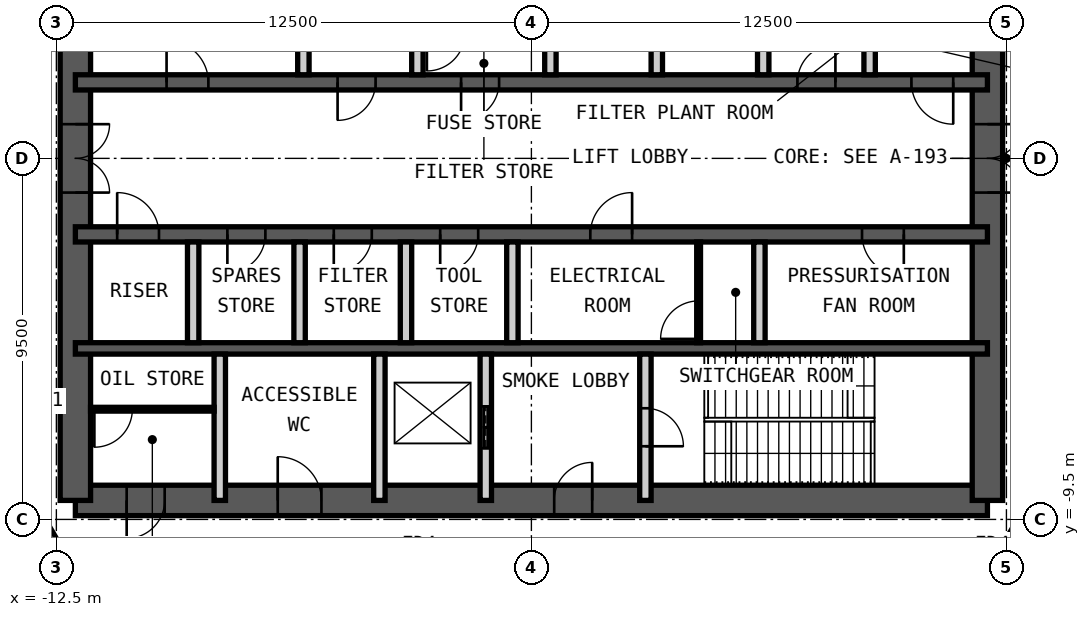
"""IFC4 building model, lengths in metres.
Left out: names, types, materials, properties, quantities, classifications, styles, units other than length and angle.
Written with IfcOpenShell. Run it as: python <this file> out.ifc"""

import sys

from ifc_helpers import new_model, si_unit, direction, frame, frame_2d, origin, place, context, subcontext, project, spatial, rectangle, extrude, element, fill, save


model = new_model("IFC4")
c1 = context("Model", 3, precision=1e-05, world=origin(), true_north=direction((0.0, 1.0)))
c2 = subcontext(c1, "Body", "Model", "MODEL_VIEW")
j1 = project(units=[si_unit("LENGTHUNIT", "METRE"), si_unit("PLANEANGLEUNIT", "RADIAN")], contexts=[c1])
p1 = place(None, origin())
s1 = spatial("IfcSite", under=j1, at=p1, CompositionType="ELEMENT")
p2 = place(p1, origin())
s2 = spatial("IfcBuilding", under=s1, at=p2, CompositionType="ELEMENT")
p3 = place(p2, frame((0.0, 0.0, 337.6)))
s3 = spatial("IfcBuildingStorey", under=s2, at=p3, CompositionType="ELEMENT", Elevation=337.6)
p4 = place(p3, frame((-12.0, -9.0, 0.0), z_axis=(0.0, 0.0, 1.0), x_axis=(1.0, 0.0, 0.0)))
e1 = element("IfcWall", 1, at=p4, inside=s3, PredefinedType="SHEAR", context=c2, shape_type="SweptSolid", body=[
    extrude(rectangle(XDim=24.0, YDim=0.8, at=frame_2d((12.0, 0.0))), origin(), (0.0, 0.0, 1.0), 6.0),
])
p5 = place(p4, frame((1.35, 0.0, 0.0)))
e2 = element("IfcOpeningElement", 2, at=p5, cuts=e1, PredefinedType="OPENING", context=c2, shape_type="SweptSolid", body=[
    extrude(rectangle(XDim=1.0, YDim=2.1, at=frame_2d((0.5, 1.05))), frame((0.0, 0.41, 0.0), z_axis=(0.0, -1.0, 0.0), x_axis=(1.0, 0.0, 0.0)), (0.0, 0.0, 1.0), 0.82),
])
p6 = place(p4, frame((5.325, 0.0, 0.0)))
e3 = element("IfcOpeningElement", 3, at=p6, cuts=e1, PredefinedType="OPENING", context=c2, shape_type="SweptSolid", body=[
    extrude(rectangle(XDim=1.15, YDim=2.1, at=frame_2d((0.575, 1.05))), frame((0.0, 0.41, 0.0), z_axis=(0.0, -1.0, 0.0), x_axis=(1.0, 0.0, 0.0)), (0.0, 0.0, 1.0), 0.82),
])
p7 = place(p4, frame((12.6, 0.0, 0.0)))
e4 = element("IfcOpeningElement", 4, at=p7, cuts=e1, PredefinedType="OPENING", context=c2, shape_type="SweptSolid", body=[
    extrude(rectangle(XDim=1.0, YDim=2.1, at=frame_2d((0.5, 1.05))), frame((0.0, 0.41, 0.0), z_axis=(0.0, -1.0, 0.0), x_axis=(1.0, 0.0, 0.0)), (0.0, 0.0, 1.0), 0.82),
])
p8 = place(p3, frame((12.0, -9.0, 0.0), z_axis=(0.0, 0.0, 1.0), x_axis=(0.0, 1.0, 0.0)))
e5 = element("IfcWall", 5, at=p8, inside=s3, PredefinedType="SHEAR", context=c2, shape_type="SweptSolid", body=[
    extrude(rectangle(XDim=18.0, YDim=0.8, at=frame_2d((9.0, 0.0))), origin(), (0.0, 0.0, 1.0), 6.0),
])
p9 = place(p8, frame((8.1, 0.0, 0.0)))
e6 = element("IfcOpeningElement", 6, at=p9, cuts=e5, PredefinedType="OPENING", context=c2, shape_type="SweptSolid", body=[
    extrude(rectangle(XDim=1.8, YDim=2.1, at=frame_2d((0.9, 1.05))), frame((0.0, 0.41, 0.0), z_axis=(0.0, -1.0, 0.0), x_axis=(1.0, 0.0, 0.0)), (0.0, 0.0, 1.0), 0.82),
])
p10 = place(p3, frame((-12.0, -9.0, 0.0), z_axis=(0.0, 0.0, 1.0), x_axis=(0.0, 1.0, 0.0)))
e7 = element("IfcWall", 7, at=p10, inside=s3, PredefinedType="SHEAR", context=c2, shape_type="SweptSolid", body=[
    extrude(rectangle(XDim=18.0, YDim=0.8, at=frame_2d((9.0, 0.0))), origin(), (0.0, 0.0, 1.0), 6.0),
])
p11 = place(p10, frame((8.1, 0.0, 0.0)))
e8 = element("IfcOpeningElement", 8, at=p11, cuts=e7, PredefinedType="OPENING", context=c2, shape_type="SweptSolid", body=[
    extrude(rectangle(XDim=1.8, YDim=2.1, at=frame_2d((0.9, 1.05))), frame((0.0, 0.41, 0.0), z_axis=(0.0, -1.0, 0.0), x_axis=(1.0, 0.0, 0.0)), (0.0, 0.0, 1.0), 0.82),
])
p12 = place(p3, frame((-12.0, 2.0, 0.0), z_axis=(0.0, 0.0, 1.0), x_axis=(1.0, 0.0, 0.0)))
e9 = element("IfcWall", 9, at=p12, inside=s3, PredefinedType="SHEAR", context=c2, shape_type="SweptSolid", body=[
    extrude(rectangle(XDim=24.0, YDim=0.4, at=frame_2d((12.0, 0.0))), origin(), (0.0, 0.0, 1.0), 6.0),
])
p13 = place(p12, frame((2.4, 0.0, 0.0)))
e10 = element("IfcOpeningElement", 10, at=p13, cuts=e9, PredefinedType="OPENING", context=c2, shape_type="SweptSolid", body=[
    extrude(rectangle(XDim=1.1, YDim=2.1, at=frame_2d((0.55, 1.05))), frame((0.0, 0.21, 0.0), z_axis=(0.0, -1.0, 0.0), x_axis=(1.0, 0.0, 0.0)), (0.0, 0.0, 1.0), 0.42),
])
p14 = place(p12, frame((22.0, 0.0, 0.0)))
e11 = element("IfcOpeningElement", 11, at=p14, cuts=e9, PredefinedType="OPENING", context=c2, shape_type="SweptSolid", body=[
    extrude(rectangle(XDim=1.1, YDim=2.1, at=frame_2d((0.55, 1.05))), frame((0.0, 0.21, 0.0), z_axis=(0.0, -1.0, 0.0), x_axis=(1.0, 0.0, 0.0)), (0.0, 0.0, 1.0), 0.42),
])
p15 = place(p12, frame((10.15, 0.0, 0.0)))
e12 = element("IfcOpeningElement", 12, at=p15, cuts=e9, PredefinedType="OPENING", context=c2, shape_type="SweptSolid", body=[
    extrude(rectangle(XDim=1.0, YDim=2.1, at=frame_2d((0.5, 1.05))), frame((0.0, 0.21, 0.0), z_axis=(0.0, -1.0, 0.0), x_axis=(1.0, 0.0, 0.0)), (0.0, 0.0, 1.0), 0.42),
])
p16 = place(p12, frame((6.9, 0.0, 0.0)))
e13 = element("IfcOpeningElement", 13, at=p16, cuts=e9, PredefinedType="OPENING", context=c2, shape_type="SweptSolid", body=[
    extrude(rectangle(XDim=1.0, YDim=2.1, at=frame_2d((0.5, 1.05))), frame((0.0, 0.21, 0.0), z_axis=(0.0, -1.0, 0.0), x_axis=(1.0, 0.0, 0.0)), (0.0, 0.0, 1.0), 0.42),
])
p17 = place(p12, frame((19.0, 0.0, 0.0)))
e14 = element("IfcOpeningElement", 14, at=p17, cuts=e9, PredefinedType="OPENING", context=c2, shape_type="SweptSolid", body=[
    extrude(rectangle(XDim=1.0, YDim=2.1, at=frame_2d((0.5, 1.05))), frame((0.0, 0.21, 0.0), z_axis=(0.0, -1.0, 0.0), x_axis=(1.0, 0.0, 0.0)), (0.0, 0.0, 1.0), 0.42),
])
p18 = place(p3, frame((-12.0, -2.0, 0.0), z_axis=(0.0, 0.0, 1.0), x_axis=(1.0, 0.0, 0.0)))
e15 = element("IfcWall", 15, at=p18, inside=s3, PredefinedType="SHEAR", context=c2, shape_type="SweptSolid", body=[
    extrude(rectangle(XDim=24.0, YDim=0.4, at=frame_2d((12.0, 0.0))), origin(), (0.0, 0.0, 1.0), 6.0),
])
p19 = place(p18, frame((1.1, 0.0, 0.0)))
e16 = element("IfcOpeningElement", 16, at=p19, cuts=e15, PredefinedType="OPENING", context=c2, shape_type="SweptSolid", body=[
    extrude(rectangle(XDim=1.1, YDim=2.1, at=frame_2d((0.55, 1.05))), frame((0.0, 0.21, 0.0), z_axis=(0.0, -1.0, 0.0), x_axis=(1.0, 0.0, 0.0)), (0.0, 0.0, 1.0), 0.42),
])
p20 = place(p18, frame((13.55, 0.0, 0.0)))
e17 = element("IfcOpeningElement", 17, at=p20, cuts=e15, PredefinedType="OPENING", context=c2, shape_type="SweptSolid", body=[
    extrude(rectangle(XDim=1.1, YDim=2.1, at=frame_2d((0.55, 1.05))), frame((0.0, 0.21, 0.0), z_axis=(0.0, -1.0, 0.0), x_axis=(1.0, 0.0, 0.0)), (0.0, 0.0, 1.0), 0.42),
])
p21 = place(p18, frame((20.7, 0.0, 0.0)))
e18 = element("IfcOpeningElement", 18, at=p21, cuts=e15, PredefinedType="OPENING", context=c2, shape_type="SweptSolid", body=[
    extrude(rectangle(XDim=1.1, YDim=2.1, at=frame_2d((0.55, 1.05))), frame((0.0, 0.21, 0.0), z_axis=(0.0, -1.0, 0.0), x_axis=(1.0, 0.0, 0.0)), (0.0, 0.0, 1.0), 0.42),
])
p22 = place(p18, frame((4.0, 0.0, 0.0)))
e19 = element("IfcOpeningElement", 19, at=p22, cuts=e15, PredefinedType="OPENING", context=c2, shape_type="SweptSolid", body=[
    extrude(rectangle(XDim=1.0, YDim=2.1, at=frame_2d((0.5, 1.05))), frame((0.0, 0.21, 0.0), z_axis=(0.0, -1.0, 0.0), x_axis=(1.0, 0.0, 0.0)), (0.0, 0.0, 1.0), 0.42),
])
p23 = place(p18, frame((6.8, 0.0, 0.0)))
e20 = element("IfcOpeningElement", 20, at=p23, cuts=e15, PredefinedType="OPENING", context=c2, shape_type="SweptSolid", body=[
    extrude(rectangle(XDim=1.0, YDim=2.1, at=frame_2d((0.5, 1.05))), frame((0.0, 0.21, 0.0), z_axis=(0.0, -1.0, 0.0), x_axis=(1.0, 0.0, 0.0)), (0.0, 0.0, 1.0), 0.42),
])
p24 = place(p18, frame((9.6, 0.0, 0.0)))
e21 = element("IfcOpeningElement", 21, at=p24, cuts=e15, PredefinedType="OPENING", context=c2, shape_type="SweptSolid", body=[
    extrude(rectangle(XDim=1.0, YDim=2.1, at=frame_2d((0.5, 1.05))), frame((0.0, 0.21, 0.0), z_axis=(0.0, -1.0, 0.0), x_axis=(1.0, 0.0, 0.0)), (0.0, 0.0, 1.0), 0.42),
])
p25 = place(p3, frame((-12.0, -5.0, 0.0), z_axis=(0.0, 0.0, 1.0), x_axis=(1.0, 0.0, 0.0)))
e22 = element("IfcWall", 22, at=p25, inside=s3, PredefinedType="SHEAR", context=c2, shape_type="SweptSolid", body=[
    extrude(rectangle(XDim=24.0, YDim=0.3, at=frame_2d((12.0, 0.0))), origin(), (0.0, 0.0, 1.0), 6.0),
])
for number, where, z_axis, x_axis in (
    (23, (-6.0, 2.2, 0.0), (0.0, 0.0, 1.0), (0.0, 1.0, 0.0)),
    (24, (-3.0, 2.2, 0.0), (0.0, 0.0, 1.0), (0.0, 1.0, 0.0)),
    (25, (0.5, 2.2, 0.0), (0.0, 0.0, 1.0), (0.0, 1.0, 0.0)),
    (26, (3.3, 2.2, 0.0), (0.0, 0.0, 1.0), (0.0, 1.0, 0.0)),
    (27, (6.1, 2.2, 0.0), (0.0, 0.0, 1.0), (0.0, 1.0, 0.0)),
    (28, (8.9, 2.2, 0.0), (0.0, 0.0, 1.0), (0.0, 1.0, 0.0)),
    (29, (-8.9, -4.85, 0.0), (0.0, 0.0, 1.0), (0.0, 1.0, 0.0)),
    (30, (-6.1, -4.85, 0.0), (0.0, 0.0, 1.0), (0.0, 1.0, 0.0)),
    (31, (-3.3, -4.85, 0.0), (0.0, 0.0, 1.0), (0.0, 1.0, 0.0)),
    (32, (-0.5, -4.85, 0.0), (0.0, 0.0, 1.0), (0.0, 1.0, 0.0)),
    (33, (6.0, -4.85, 0.0), (0.0, 0.0, 1.0), (0.0, 1.0, 0.0)),
):
    element("IfcWall", number, at=place(p3, frame(where, z_axis=z_axis, x_axis=x_axis)), inside=s3, PredefinedType="PARTITIONING", context=c2, shape_type="SweptSolid", body=[
        extrude(rectangle(XDim=2.65, YDim=0.3, at=frame_2d((1.325, 0.0))), origin(), (0.0, 0.0, 1.0), 5.78),
    ])
for number, where, z_axis, x_axis in (
    (34, (-8.2, -9.0, 0.0), (0.0, 0.0, 1.0), (0.0, 1.0, 0.0)),
    (35, (-4.0, -9.0, 0.0), (0.0, 0.0, 1.0), (0.0, 1.0, 0.0)),
):
    element("IfcWall", number, at=place(p3, frame(where, z_axis=z_axis, x_axis=x_axis)), inside=s3, PredefinedType="PARTITIONING", context=c2, shape_type="SweptSolid", body=[
        extrude(rectangle(XDim=3.85, YDim=0.3, at=frame_2d((1.925, 0.0))), origin(), (0.0, 0.0, 1.0), 5.78),
    ])
p26 = place(p3, frame((-1.2, -9.0, 0.0), z_axis=(0.0, 0.0, 1.0), x_axis=(0.0, 1.0, 0.0)))
e36 = element("IfcWall", 36, at=p26, inside=s3, PredefinedType="PARTITIONING", context=c2, shape_type="SweptSolid", body=[
    extrude(rectangle(XDim=3.85, YDim=0.3, at=frame_2d((1.925, 0.0))), origin(), (0.0, 0.0, 1.0), 5.78),
])
p27 = place(p26, frame((1.375, 0.0, 0.0)))
e37 = element("IfcOpeningElement", 37, at=p27, cuts=e36, PredefinedType="OPENING", context=c2, shape_type="SweptSolid", body=[
    extrude(rectangle(XDim=1.1, YDim=2.4, at=frame_2d((0.55, 1.2))), frame((0.0, 0.16, 0.0), z_axis=(0.0, -1.0, 0.0), x_axis=(1.0, 0.0, 0.0)), (0.0, 0.0, 1.0), 0.32),
])
p28 = place(p3, frame((3.0, -9.0, 0.0), z_axis=(0.0, 0.0, 1.0), x_axis=(0.0, 1.0, 0.0)))
e38 = element("IfcWall", 38, at=p28, inside=s3, PredefinedType="PARTITIONING", context=c2, shape_type="SweptSolid", body=[
    extrude(rectangle(XDim=3.85, YDim=0.3, at=frame_2d((1.925, 0.0))), origin(), (0.0, 0.0, 1.0), 5.78),
])
p29 = place(p28, frame((1.425, 0.0, 0.0)))
e39 = element("IfcOpeningElement", 39, at=p29, cuts=e38, PredefinedType="OPENING", context=c2, shape_type="SweptSolid", body=[
    extrude(rectangle(XDim=1.0, YDim=2.1, at=frame_2d((0.5, 1.05))), frame((0.0, 0.16, 0.0), z_axis=(0.0, -1.0, 0.0), x_axis=(1.0, 0.0, 0.0)), (0.0, 0.0, 1.0), 0.32),
])
p30 = place(p3, frame((4.4, -4.85, 0.0), z_axis=(0.0, 0.0, 1.0), x_axis=(0.0, 1.0, 0.0)))
e40 = element("IfcWall", 40, at=p30, inside=s3, PredefinedType="PARTITIONING", context=c2, shape_type="SweptSolid", body=[
    extrude(rectangle(XDim=2.65, YDim=0.1, at=frame_2d((1.325, 0.0))), origin(), (0.0, 0.0, 1.0), 5.78),
])
p31 = place(p30, frame((0.1, 0.0, 0.0)))
e41 = element("IfcOpeningElement", 41, at=p31, cuts=e40, PredefinedType="OPENING", context=c2, shape_type="SweptSolid", body=[
    extrude(rectangle(XDim=1.0, YDim=2.4, at=frame_2d((0.5, 1.2))), frame((0.0, 0.06, 0.0), z_axis=(0.0, -1.0, 0.0), x_axis=(1.0, 0.0, 0.0)), (0.0, 0.0, 1.0), 0.12),
])
p32 = place(p3, frame((-11.6, -6.6, 0.0), z_axis=(0.0, 0.0, 1.0), x_axis=(1.0, 0.0, 0.0)))
e42 = element("IfcWall", 42, at=p32, inside=s3, PredefinedType="PARTITIONING", context=c2, shape_type="SweptSolid", body=[
    extrude(rectangle(XDim=3.25, YDim=0.1, at=frame_2d((1.625, 0.0))), origin(), (0.0, 0.0, 1.0), 5.78),
])
p33 = place(p32, frame((0.1, 0.0, 0.0)))
e43 = element("IfcOpeningElement", 43, at=p33, cuts=e42, PredefinedType="OPENING", context=c2, shape_type="SweptSolid", body=[
    extrude(rectangle(XDim=1.0, YDim=2.4, at=frame_2d((0.5, 1.2))), frame((0.0, 0.06, 0.0), z_axis=(0.0, -1.0, 0.0), x_axis=(1.0, 0.0, 0.0)), (0.0, 0.0, 1.0), 0.12),
])
p34 = place(p3, frame((16.411, -12.096, 0.0), z_axis=(0.0, 0.0, 1.0), x_axis=(-0.866032659912, 0.499987431809, 0.0)))
e44 = element("IfcWall", 44, at=p34, inside=s3, PredefinedType="PARTITIONING", context=c2, shape_type="SweptSolid", body=[
    extrude(rectangle(XDim=4.36, YDim=0.15, at=frame_2d((2.18, 0.0))), origin(), (0.0, 0.0, 1.0), 4.85),
])
p35 = place(p3, frame((15.883, -4.29, 0.0), z_axis=(0.0, 0.0, 1.0), x_axis=(-0.500003318956, -0.866023487576, 0.0)))
e45 = element("IfcWall", 45, at=p35, inside=s3, PredefinedType="PARTITIONING", context=c2, shape_type="SweptSolid", body=[
    extrude(rectangle(XDim=6.496, YDim=0.15, at=frame_2d((3.248, 0.0))), origin(), (0.0, 0.0, 1.0), 5.75),
])
p36 = place(p35, frame((2.348, 0.0, 0.0)))
e46 = element("IfcOpeningElement", 46, at=p36, cuts=e45, PredefinedType="OPENING", context=c2, shape_type="SweptSolid", body=[
    extrude(rectangle(XDim=1.8, YDim=2.4, at=frame_2d((0.9, 1.2))), frame((0.0, 0.085, 0.0), z_axis=(0.0, -1.0, 0.0), x_axis=(1.0, 0.0, 0.0)), (0.0, 0.0, 1.0), 0.17),
])
p37 = place(p3, frame((-11.657, -11.61, 0.0), z_axis=(0.0, 0.0, 1.0), x_axis=(-0.500003318956, 0.866023487576, 0.0)))
e47 = element("IfcWall", 47, at=p37, inside=s3, PredefinedType="PARTITIONING", context=c2, shape_type="SweptSolid", body=[
    extrude(rectangle(XDim=6.496, YDim=0.15, at=frame_2d((3.248, 0.0))), origin(), (0.0, 0.0, 1.0), 5.75),
])
p38 = place(p37, frame((4.297, 0.0, 0.0)))
e48 = element("IfcOpeningElement", 48, at=p38, cuts=e47, PredefinedType="OPENING", context=c2, shape_type="SweptSolid", body=[
    extrude(rectangle(XDim=1.8, YDim=2.4, at=frame_2d((0.9, 1.2))), frame((0.0, 0.085, 0.0), z_axis=(0.0, -1.0, 0.0), x_axis=(1.0, 0.0, 0.0)), (0.0, 0.0, 1.0), 0.17),
])
p39 = place(p5, origin())
e49 = element("IfcDoor", 49, at=p39, inside=s3, OperationType="SINGLE_SWING_LEFT", PredefinedType="DOOR", context=c2, shape_type="SweptSolid", body=[
    extrude(rectangle(XDim=1.0, YDim=2.1, at=frame_2d((0.5, 1.05))), frame((0.0, 0.025, 0.0), z_axis=(0.0, -1.0, 0.0), x_axis=(1.0, 0.0, 0.0)), (0.0, 0.0, 1.0), 0.05),
])
fill(e2, e49)
p40 = place(p6, origin())
e50 = element("IfcDoor", 50, at=p40, inside=s3, OperationType="SINGLE_SWING_RIGHT", PredefinedType="DOOR", context=c2, shape_type="SweptSolid", body=[
    extrude(rectangle(XDim=1.15, YDim=2.1, at=frame_2d((0.575, 1.05))), frame((0.0, 0.025, 0.0), z_axis=(0.0, -1.0, 0.0), x_axis=(1.0, 0.0, 0.0)), (0.0, 0.0, 1.0), 0.05),
])
fill(e3, e50)
p41 = place(p7, origin())
e51 = element("IfcDoor", 51, at=p41, inside=s3, OperationType="SINGLE_SWING_LEFT", PredefinedType="DOOR", context=c2, shape_type="SweptSolid", body=[
    extrude(rectangle(XDim=1.0, YDim=2.1, at=frame_2d((0.5, 1.05))), frame((0.0, 0.025, 0.0), z_axis=(0.0, -1.0, 0.0), x_axis=(1.0, 0.0, 0.0)), (0.0, 0.0, 1.0), 0.05),
])
fill(e4, e51)
p42 = place(p29, origin())
e52 = element("IfcDoor", 52, at=p42, inside=s3, OperationType="SINGLE_SWING_LEFT", PredefinedType="DOOR", context=c2, shape_type="SweptSolid", body=[
    extrude(rectangle(XDim=1.0, YDim=2.1, at=frame_2d((0.5, 1.05))), frame((0.0, 0.025, 0.0), z_axis=(0.0, -1.0, 0.0), x_axis=(1.0, 0.0, 0.0)), (0.0, 0.0, 1.0), 0.05),
])
fill(e39, e52)
p43 = place(p13, origin())
e53 = element("IfcDoor", 53, at=p43, inside=s3, OperationType="SINGLE_SWING_RIGHT", PredefinedType="DOOR", context=c2, shape_type="SweptSolid", body=[
    extrude(rectangle(XDim=1.1, YDim=2.1, at=frame_2d((0.55, 1.05))), frame((0.0, 0.025, 0.0), z_axis=(0.0, -1.0, 0.0), x_axis=(1.0, 0.0, 0.0)), (0.0, 0.0, 1.0), 0.05),
])
fill(e10, e53)
p44 = place(p19, origin())
e54 = element("IfcDoor", 54, at=p44, inside=s3, OperationType="SINGLE_SWING_RIGHT", PredefinedType="DOOR", context=c2, shape_type="SweptSolid", body=[
    extrude(rectangle(XDim=1.1, YDim=2.1, at=frame_2d((0.55, 1.05))), frame((0.0, 0.025, 0.0), z_axis=(0.0, -1.0, 0.0), x_axis=(1.0, 0.0, 0.0)), (0.0, 0.0, 1.0), 0.05),
])
fill(e16, e54)
p45 = place(p14, origin())
e55 = element("IfcDoor", 55, at=p45, inside=s3, OperationType="SINGLE_SWING_RIGHT", PredefinedType="DOOR", context=c2, shape_type="SweptSolid", body=[
    extrude(rectangle(XDim=1.1, YDim=2.1, at=frame_2d((0.55, 1.05))), frame((0.0, 0.025, 0.0), z_axis=(0.0, -1.0, 0.0), x_axis=(1.0, 0.0, 0.0)), (0.0, 0.0, 1.0), 0.05),
])
fill(e11, e55)
p46 = place(p15, origin())
e56 = element("IfcDoor", 56, at=p46, inside=s3, OperationType="SINGLE_SWING_LEFT", PredefinedType="DOOR", context=c2, shape_type="SweptSolid", body=[
    extrude(rectangle(XDim=1.0, YDim=2.1, at=frame_2d((0.5, 1.05))), frame((0.0, 0.025, 0.0), z_axis=(0.0, -1.0, 0.0), x_axis=(1.0, 0.0, 0.0)), (0.0, 0.0, 1.0), 0.05),
])
fill(e12, e56)
p47 = place(p20, origin())
e57 = element("IfcDoor", 57, at=p47, inside=s3, OperationType="SINGLE_SWING_LEFT", PredefinedType="DOOR", context=c2, shape_type="SweptSolid", body=[
    extrude(rectangle(XDim=1.1, YDim=2.1, at=frame_2d((0.55, 1.05))), frame((0.0, 0.025, 0.0), z_axis=(0.0, -1.0, 0.0), x_axis=(1.0, 0.0, 0.0)), (0.0, 0.0, 1.0), 0.05),
])
fill(e17, e57)
p48 = place(p21, origin())
e58 = element("IfcDoor", 58, at=p48, inside=s3, OperationType="SINGLE_SWING_RIGHT", PredefinedType="DOOR", context=c2, shape_type="SweptSolid", body=[
    extrude(rectangle(XDim=1.1, YDim=2.1, at=frame_2d((0.55, 1.05))), frame((0.0, 0.025, 0.0), z_axis=(0.0, -1.0, 0.0), x_axis=(1.0, 0.0, 0.0)), (0.0, 0.0, 1.0), 0.05),
])
fill(e18, e58)
p49 = place(p9, origin())
e59 = element("IfcDoor", 59, at=p49, inside=s3, OperationType="DOUBLE_DOOR_DOUBLE_SWING", PredefinedType="DOOR", context=c2, shape_type="SweptSolid", body=[
    extrude(rectangle(XDim=1.8, YDim=2.1, at=frame_2d((0.9, 1.05))), frame((0.0, 0.025, 0.0), z_axis=(0.0, -1.0, 0.0), x_axis=(1.0, 0.0, 0.0)), (0.0, 0.0, 1.0), 0.05),
])
fill(e6, e59)
p50 = place(p11, origin())
e60 = element("IfcDoor", 60, at=p50, inside=s3, OperationType="DOUBLE_DOOR_DOUBLE_SWING", PredefinedType="DOOR", context=c2, shape_type="SweptSolid", body=[
    extrude(rectangle(XDim=1.8, YDim=2.1, at=frame_2d((0.9, 1.05))), frame((0.0, 0.025, 0.0), z_axis=(0.0, -1.0, 0.0), x_axis=(1.0, 0.0, 0.0)), (0.0, 0.0, 1.0), 0.05),
])
fill(e8, e60)
p51 = place(p27, origin())
e61 = element("IfcDoor", 61, at=p51, inside=s3, OperationType="DOUBLE_DOOR_SLIDING", PredefinedType="DOOR", context=c2, shape_type="SweptSolid", body=[
    extrude(rectangle(XDim=1.1, YDim=2.4, at=frame_2d((0.55, 1.2))), frame((0.0, 0.025, 0.0), z_axis=(0.0, -1.0, 0.0), x_axis=(1.0, 0.0, 0.0)), (0.0, 0.0, 1.0), 0.05),
])
fill(e37, e61)
p52 = place(p16, origin())
e62 = element("IfcDoor", 62, at=p52, inside=s3, OperationType="SINGLE_SWING_LEFT", PredefinedType="DOOR", context=c2, shape_type="SweptSolid", body=[
    extrude(rectangle(XDim=1.0, YDim=2.1, at=frame_2d((0.5, 1.05))), frame((0.0, 0.025, 0.0), z_axis=(0.0, -1.0, 0.0), x_axis=(1.0, 0.0, 0.0)), (0.0, 0.0, 1.0), 0.05),
])
fill(e13, e62)
p53 = place(p17, origin())
e63 = element("IfcDoor", 63, at=p53, inside=s3, OperationType="SINGLE_SWING_LEFT", PredefinedType="DOOR", context=c2, shape_type="SweptSolid", body=[
    extrude(rectangle(XDim=1.0, YDim=2.1, at=frame_2d((0.5, 1.05))), frame((0.0, 0.025, 0.0), z_axis=(0.0, -1.0, 0.0), x_axis=(1.0, 0.0, 0.0)), (0.0, 0.0, 1.0), 0.05),
])
fill(e14, e63)
p54 = place(p22, origin())
e64 = element("IfcDoor", 64, at=p54, inside=s3, OperationType="SINGLE_SWING_LEFT", PredefinedType="DOOR", context=c2, shape_type="SweptSolid", body=[
    extrude(rectangle(XDim=1.0, YDim=2.1, at=frame_2d((0.5, 1.05))), frame((0.0, 0.025, 0.0), z_axis=(0.0, -1.0, 0.0), x_axis=(1.0, 0.0, 0.0)), (0.0, 0.0, 1.0), 0.05),
])
fill(e19, e64)
p55 = place(p23, origin())
e65 = element("IfcDoor", 65, at=p55, inside=s3, OperationType="SINGLE_SWING_LEFT", PredefinedType="DOOR", context=c2, shape_type="SweptSolid", body=[
    extrude(rectangle(XDim=1.0, YDim=2.1, at=frame_2d((0.5, 1.05))), frame((0.0, 0.025, 0.0), z_axis=(0.0, -1.0, 0.0), x_axis=(1.0, 0.0, 0.0)), (0.0, 0.0, 1.0), 0.05),
])
fill(e20, e65)
p56 = place(p24, origin())
e66 = element("IfcDoor", 66, at=p56, inside=s3, OperationType="SINGLE_SWING_LEFT", PredefinedType="DOOR", context=c2, shape_type="SweptSolid", body=[
    extrude(rectangle(XDim=1.0, YDim=2.1, at=frame_2d((0.5, 1.05))), frame((0.0, 0.025, 0.0), z_axis=(0.0, -1.0, 0.0), x_axis=(1.0, 0.0, 0.0)), (0.0, 0.0, 1.0), 0.05),
])
fill(e21, e66)
p57 = place(p31, origin())
e67 = element("IfcDoor", 67, at=p57, inside=s3, OperationType="SINGLE_SWING_RIGHT", PredefinedType="DOOR", context=c2, shape_type="SweptSolid", body=[
    extrude(rectangle(XDim=1.0, YDim=2.4, at=frame_2d((0.5, 1.2))), frame((0.0, 0.025, 0.0), z_axis=(0.0, -1.0, 0.0), x_axis=(1.0, 0.0, 0.0)), (0.0, 0.0, 1.0), 0.05),
])
fill(e41, e67)
p58 = place(p33, origin())
e68 = element("IfcDoor", 68, at=p58, inside=s3, OperationType="SINGLE_SWING_LEFT", PredefinedType="DOOR", context=c2, shape_type="SweptSolid", body=[
    extrude(rectangle(XDim=1.0, YDim=2.4, at=frame_2d((0.5, 1.2))), frame((0.0, 0.025, 0.0), z_axis=(0.0, -1.0, 0.0), x_axis=(1.0, 0.0, 0.0)), (0.0, 0.0, 1.0), 0.05),
])
fill(e43, e68)
save(model, sys.argv[1])
